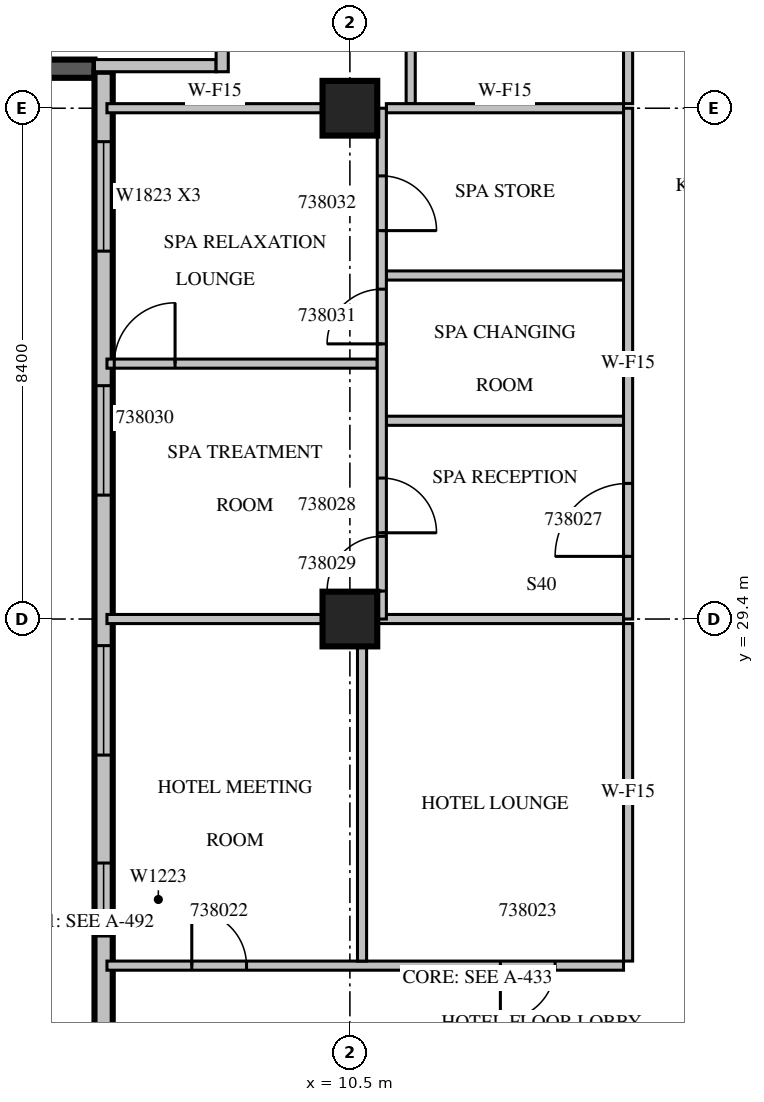
"""IFC4 building model, lengths in metres.
Left out: names, types, materials, properties, quantities, classifications, styles, units other than length and angle.
Written with IfcOpenShell. Run it as: python <this file> out.ifc"""

import sys

from ifc_helpers import new_model, si_unit, direction, frame, frame_2d, origin, origin_2d, place, context, subcontext, project, spatial, rectangle, extrude, source, transform, mapped, element, fill, save


model = new_model("IFC4")
c1 = context("Model", 3, precision=1e-05, world=origin(), true_north=direction((0.0, 1.0)))
c2 = subcontext(c1, "Body", "Model", "MODEL_VIEW")
j1 = project(units=[si_unit("LENGTHUNIT", "METRE"), si_unit("PLANEANGLEUNIT", "RADIAN")], contexts=[c1])
p1 = place(None, origin())
s1 = spatial("IfcSite", under=j1, at=p1, CompositionType="ELEMENT")
p2 = place(p1, origin())
s2 = spatial("IfcBuilding", under=s1, at=p2, CompositionType="ELEMENT")
p3 = place(p2, frame((0.0, 0.0, 177.8)))
s3 = spatial("IfcBuildingStorey", under=s2, at=p3, CompositionType="ELEMENT", Elevation=177.8)
m1 = source(origin(), c2, "Body", "SweptSolid", [
    extrude(rectangle(XDim=0.9, YDim=0.9, at=origin_2d()), origin(), (0.0, 0.0, 1.0), 3.8),
])
for number, where, z_axis, x_axis in (
    (1, (10.5, 29.4, 0.0), (0.0, 0.0, 1.0), (1.0, 0.0, 0.0)),
    (2, (10.5, 37.8, 0.0), (0.0, 0.0, 1.0), (1.0, 0.0, 0.0)),
):
    element("IfcColumn", number, at=place(p3, frame(where, z_axis=z_axis, x_axis=x_axis)), inside=s3, PredefinedType="COLUMN", context=c2, shape_type="MappedRepresentation", body=[
        mapped(m1, transform((0.0, 0.0, 0.0), scale=1.0)),
    ])
m2 = source(origin(), c2, "Body", "SweptSolid", [
    extrude(rectangle(XDim=6.1, YDim=0.3, at=frame_2d((3.05, 0.0))), origin(), (0.0, 0.0, 1.0), 3.4),
])
p4 = place(p3, frame((0.2, 38.45, 0.0), z_axis=(0.0, 0.0, 1.0), x_axis=(1.0, 0.0, 0.0)))
e3 = element("IfcWall", 3, at=p4, inside=s3, PredefinedType="SOLIDWALL", context=c2, shape_type="MappedRepresentation", body=[
    mapped(m2, transform((0.0, 0.0, 0.0), scale=1.0)),
])
p5 = place(p3, frame((6.45, 38.4, 0.0), z_axis=(0.0, 0.0, 1.0), x_axis=(0.0, -1.0, 0.0)))
e4 = element("IfcWall", 4, at=p5, inside=s3, PredefinedType="STANDARD", context=c2, shape_type="SweptSolid", body=[
    extrude(rectangle(XDim=16.6, YDim=0.3, at=frame_2d((8.3, 0.0))), origin(), (0.0, 0.0, 1.0), 3.4),
])
m3 = source(origin(), c2, "Body", "SweptSolid", [
    extrude(rectangle(XDim=1.8, YDim=2.3, at=frame_2d((0.9, 1.15))), frame((0.0, 0.16, 0.0), z_axis=(0.0, -1.0, 0.0), x_axis=(1.0, 0.0, 0.0)), (0.0, 0.0, 1.0), 0.32),
])
p6 = place(p5, frame((1.15, 0.0, 0.6)))
e5 = element("IfcOpeningElement", 5, at=p6, cuts=e4, PredefinedType="OPENING", context=c2, shape_type="MappedRepresentation", body=[
    mapped(m3, transform((0.0, 0.0, 0.0), scale=1.0)),
])
p7 = place(p5, frame((5.162, 0.0, 0.6)))
e6 = element("IfcOpeningElement", 6, at=p7, cuts=e4, PredefinedType="OPENING", context=c2, shape_type="MappedRepresentation", body=[
    mapped(m3, transform((0.0, 0.0, 0.0), scale=1.0)),
])
p8 = place(p5, frame((9.438, 0.0, 0.6)))
e7 = element("IfcOpeningElement", 7, at=p8, cuts=e4, PredefinedType="OPENING", context=c2, shape_type="MappedRepresentation", body=[
    mapped(m3, transform((0.0, 0.0, 0.0), scale=1.0)),
])
m4 = source(origin(), c2, "Body", "SweptSolid", [
    extrude(rectangle(XDim=1.2, YDim=2.3, at=frame_2d((0.6, 1.15))), frame((0.0, 0.16, 0.0), z_axis=(0.0, -1.0, 0.0), x_axis=(1.0, 0.0, 0.0)), (0.0, 0.0, 1.0), 0.32),
])
p9 = place(p5, frame((13.012, 0.0, 0.6)))
e8 = element("IfcOpeningElement", 8, at=p9, cuts=e4, PredefinedType="OPENING", context=c2, shape_type="MappedRepresentation", body=[
    mapped(m4, transform((0.0, 0.0, 0.0), scale=1.0)),
])
p10 = place(p3, frame((6.3, 38.5, 0.0), z_axis=(0.0, 0.0, 1.0), x_axis=(1.0, 0.0, 0.0)))
e9 = element("IfcWall", 9, at=p10, inside=s3, PredefinedType="PARTITIONING", context=c2, shape_type="SweptSolid", body=[
    extrude(rectangle(XDim=2.0, YDim=0.2, at=frame_2d((1.0, 0.0))), origin(), (0.0, 0.0, 1.0), 3.4),
])
m5 = source(origin(), c2, "Body", "SweptSolid", [
    extrude(rectangle(XDim=5.45, YDim=0.2, at=frame_2d((2.725, 0.0))), origin(), (0.0, 0.0, 1.0), 3.4),
])
p11 = place(p3, frame((8.4, 38.4, 0.0), z_axis=(0.0, 0.0, 1.0), x_axis=(0.0, 1.0, 0.0)))
e10 = element("IfcWall", 10, at=p11, inside=s3, PredefinedType="PARTITIONING", context=c2, shape_type="MappedRepresentation", body=[
    mapped(m5, transform((0.0, 0.0, 0.0), scale=1.0)),
])
m6 = source(origin(), c2, "Body", "SweptSolid", [
    extrude(rectangle(XDim=1.2, YDim=2.1, at=frame_2d((0.6, 1.05))), frame((0.0, 0.11, 0.0), z_axis=(0.0, -1.0, 0.0), x_axis=(1.0, 0.0, 0.0)), (0.0, 0.0, 1.0), 0.22),
])
p12 = place(p11, frame((0.4, 0.0, 0.0)))
e11 = element("IfcOpeningElement", 11, at=p12, cuts=e10, PredefinedType="OPENING", context=c2, shape_type="MappedRepresentation", body=[
    mapped(m6, transform((0.0, 0.0, 0.0), scale=1.0)),
])
m7 = source(origin(), c2, "Body", "SweptSolid", [
    extrude(rectangle(XDim=0.9, YDim=2.1, at=frame_2d((0.45, 1.05))), frame((0.0, 0.11, 0.0), z_axis=(0.0, -1.0, 0.0), x_axis=(1.0, 0.0, 0.0)), (0.0, 0.0, 1.0), 0.22),
])
p13 = place(p11, frame((3.25, 0.0, 0.0)))
e12 = element("IfcOpeningElement", 12, at=p13, cuts=e10, PredefinedType="OPENING", context=c2, shape_type="MappedRepresentation", body=[
    mapped(m7, transform((0.0, 0.0, 0.0), scale=1.0)),
])
p14 = place(p3, frame((6.505, 23.7, 0.0), z_axis=(0.0, 0.0, 1.0), x_axis=(1.0, 0.0, 0.0)))
e13 = element("IfcWall", 13, at=p14, inside=s3, PredefinedType="PARTITIONING", context=c2, shape_type="SweptSolid", body=[
    extrude(rectangle(XDim=8.495, YDim=0.15, at=frame_2d((4.247, 0.0))), origin(), (0.0, 0.0, 1.0), 3.4),
])
m8 = source(origin(), c2, "Body", "SweptSolid", [
    extrude(rectangle(XDim=0.9, YDim=2.1, at=frame_2d((0.45, 1.05))), frame((0.0, 0.085, 0.0), z_axis=(0.0, -1.0, 0.0), x_axis=(1.0, 0.0, 0.0)), (0.0, 0.0, 1.0), 0.17),
])
p15 = place(p14, frame((1.395, 0.0, 0.0)))
e14 = element("IfcOpeningElement", 14, at=p15, cuts=e13, PredefinedType="OPENING", context=c2, shape_type="MappedRepresentation", body=[
    mapped(m8, transform((0.0, 0.0, 0.0), scale=1.0)),
])
p16 = place(p14, frame((6.47, 0.0, 0.0)))
e15 = element("IfcOpeningElement", 15, at=p16, cuts=e13, PredefinedType="OPENING", context=c2, shape_type="MappedRepresentation", body=[
    mapped(m8, transform((0.0, 0.0, 0.0), scale=1.0)),
])
p17 = place(p3, frame((10.7, 23.775, 0.0), z_axis=(0.0, 0.0, 1.0), x_axis=(0.0, 1.0, 0.0)))
e16 = element("IfcWall", 16, at=p17, inside=s3, PredefinedType="PARTITIONING", context=c2, shape_type="SweptSolid", body=[
    extrude(rectangle(XDim=5.176, YDim=0.15, at=frame_2d((2.588, 0.0))), origin(), (0.0, 0.0, 1.0), 3.4),
])
m9 = source(origin(), c2, "Body", "SweptSolid", [
    extrude(rectangle(XDim=5.55, YDim=0.15, at=frame_2d((2.775, 0.0))), origin(), (0.0, 0.0, 1.0), 3.4),
])
p18 = place(p3, frame((15.075, 23.775, 0.0), z_axis=(0.0, 0.0, 1.0), x_axis=(0.0, 1.0, 0.0)))
e17 = element("IfcWall", 17, at=p18, inside=s3, PredefinedType="PARTITIONING", context=c2, shape_type="MappedRepresentation", body=[
    mapped(m9, transform((0.0, 0.0, 0.0), scale=1.0)),
])
p19 = place(p3, frame((10.051, 29.4, 0.0), z_axis=(0.0, 0.0, 1.0), x_axis=(-1.0, 0.0, 0.0)))
e18 = element("IfcWall", 18, at=p19, inside=s3, PredefinedType="PARTITIONING", context=c2, shape_type="SweptSolid", body=[
    extrude(rectangle(XDim=3.546, YDim=0.15, at=frame_2d((1.773, 0.0))), origin(), (0.0, 0.0, 1.0), 3.4),
])
m10 = source(origin(), c2, "Body", "SweptSolid", [
    extrude(rectangle(XDim=4.051, YDim=0.15, at=frame_2d((2.026, 0.0))), origin(), (0.0, 0.0, 1.0), 3.4),
])
p20 = place(p3, frame((15.0, 29.4, 0.0), z_axis=(0.0, 0.0, 1.0), x_axis=(-1.0, 0.0, 0.0)))
e19 = element("IfcWall", 19, at=p20, inside=s3, PredefinedType="PARTITIONING", context=c2, shape_type="MappedRepresentation", body=[
    mapped(m10, transform((0.0, 0.0, 0.0), scale=1.0)),
])
m11 = source(origin(), c2, "Body", "SweptSolid", [
    extrude(rectangle(XDim=6.45, YDim=0.15, at=frame_2d((3.225, 0.0))), origin(), (0.0, 0.0, 1.0), 3.4),
])
p21 = place(p3, frame((11.5, 44.325, 0.0), z_axis=(0.0, 0.0, 1.0), x_axis=(0.0, -1.0, 0.0)))
e20 = element("IfcWall", 20, at=p21, inside=s3, PredefinedType="PARTITIONING", context=c2, shape_type="MappedRepresentation", body=[
    mapped(m11, transform((0.0, 0.0, 0.0), scale=1.0)),
])
p22 = place(p3, frame((15.075, 37.875, 0.0), z_axis=(0.0, 0.0, 1.0), x_axis=(0.0, 1.0, 0.0)))
e21 = element("IfcWall", 21, at=p22, inside=s3, PredefinedType="PARTITIONING", context=c2, shape_type="MappedRepresentation", body=[
    mapped(m11, transform((0.0, 0.0, 0.0), scale=1.0)),
])
p23 = place(p22, frame((2.737, 0.0, 0.0)))
e22 = element("IfcOpeningElement", 22, at=p23, cuts=e21, PredefinedType="OPENING", context=c2, shape_type="MappedRepresentation", body=[
    mapped(m8, transform((0.0, 0.0, 0.0), scale=1.0)),
])
p24 = place(p3, frame((10.95, 33.6, 0.0), z_axis=(0.0, 0.0, 1.0), x_axis=(-1.0, 0.0, 0.0)))
e23 = element("IfcWall", 23, at=p24, inside=s3, PredefinedType="PARTITIONING", context=c2, shape_type="SweptSolid", body=[
    extrude(rectangle(XDim=4.445, YDim=0.15, at=frame_2d((2.223, 0.0))), origin(), (0.0, 0.0, 1.0), 3.4),
])
m12 = source(origin(), c2, "Body", "SweptSolid", [
    extrude(rectangle(XDim=1.0, YDim=2.1, at=frame_2d((0.5, 1.05))), frame((0.0, 0.085, 0.0), z_axis=(0.0, -1.0, 0.0), x_axis=(1.0, 0.0, 0.0)), (0.0, 0.0, 1.0), 0.17),
])
p25 = place(p24, frame((3.325, 0.0, 0.0)))
e24 = element("IfcOpeningElement", 24, at=p25, cuts=e23, PredefinedType="OPENING", context=c2, shape_type="MappedRepresentation", body=[
    mapped(m12, transform((0.0, 0.0, 0.0), scale=1.0)),
])
m13 = source(origin(), c2, "Body", "SweptSolid", [
    extrude(rectangle(XDim=3.9, YDim=0.15, at=frame_2d((1.95, 0.0))), origin(), (0.0, 0.0, 1.0), 3.4),
])
for number, where, z_axis, x_axis in (
    (25, (15.0, 32.66, 0.0), (0.0, 0.0, 1.0), (-1.0, 0.0, 0.0)),
    (26, (15.0, 35.049, 0.0), (0.0, 0.0, 1.0), (-1.0, 0.0, 0.0)),
):
    element("IfcWall", number, at=place(p3, frame(where, z_axis=z_axis, x_axis=x_axis)), inside=s3, PredefinedType="PARTITIONING", context=c2, shape_type="MappedRepresentation", body=[
        mapped(m13, transform((0.0, 0.0, 0.0), scale=1.0)),
    ])
m14 = source(origin(), c2, "Body", "SweptSolid", [
    extrude(rectangle(XDim=3.546, YDim=0.15, at=frame_2d((1.773, 0.0))), origin(), (0.0, 0.0, 1.0), 3.4),
])
p26 = place(p3, frame((10.051, 37.8, 0.0), z_axis=(0.0, 0.0, 1.0), x_axis=(-1.0, 0.0, 0.0)))
e27 = element("IfcWall", 27, at=p26, inside=s3, PredefinedType="PARTITIONING", context=c2, shape_type="MappedRepresentation", body=[
    mapped(m14, transform((0.0, 0.0, 0.0), scale=1.0)),
])
p27 = place(p3, frame((15.0, 37.8, 0.0), z_axis=(0.0, 0.0, 1.0), x_axis=(-1.0, 0.0, 0.0)))
e28 = element("IfcWall", 28, at=p27, inside=s3, PredefinedType="PARTITIONING", context=c2, shape_type="MappedRepresentation", body=[
    mapped(m13, transform((0.0, 0.0, 0.0), scale=1.0)),
])
m15 = source(origin(), c2, "Body", "SweptSolid", [
    extrude(rectangle(XDim=8.4, YDim=0.15, at=frame_2d((4.2, 0.0))), origin(), (0.0, 0.0, 1.0), 3.4),
])
p28 = place(p3, frame((11.025, 29.4, 0.0), z_axis=(0.0, 0.0, 1.0), x_axis=(0.0, 1.0, 0.0)))
e29 = element("IfcWall", 29, at=p28, inside=s3, PredefinedType="PARTITIONING", context=c2, shape_type="MappedRepresentation", body=[
    mapped(m15, transform((0.0, 0.0, 0.0), scale=1.0)),
])
p29 = place(p28, frame((1.418, 0.0, 0.0)))
e30 = element("IfcOpeningElement", 30, at=p29, cuts=e29, PredefinedType="OPENING", context=c2, shape_type="MappedRepresentation", body=[
    mapped(m8, transform((0.0, 0.0, 0.0), scale=1.0)),
])
p30 = place(p28, frame((0.46, 0.0, 0.0)))
e31 = element("IfcOpeningElement", 31, at=p30, cuts=e29, PredefinedType="OPENING", context=c2, shape_type="MappedRepresentation", body=[
    mapped(m8, transform((0.0, 0.0, 0.0), scale=1.0)),
])
p31 = place(p28, frame((4.525, 0.0, 0.0)))
e32 = element("IfcOpeningElement", 32, at=p31, cuts=e29, PredefinedType="OPENING", context=c2, shape_type="MappedRepresentation", body=[
    mapped(m8, transform((0.0, 0.0, 0.0), scale=1.0)),
])
p32 = place(p28, frame((6.387, 0.0, 0.0)))
e33 = element("IfcOpeningElement", 33, at=p32, cuts=e29, PredefinedType="OPENING", context=c2, shape_type="MappedRepresentation", body=[
    mapped(m8, transform((0.0, 0.0, 0.0), scale=1.0)),
])
p33 = place(p3, frame((15.075, 29.4, 0.0), z_axis=(0.0, 0.0, 1.0), x_axis=(0.0, 1.0, 0.0)))
e34 = element("IfcWall", 34, at=p33, inside=s3, PredefinedType="PARTITIONING", context=c2, shape_type="MappedRepresentation", body=[
    mapped(m15, transform((0.0, 0.0, 0.0), scale=1.0)),
])
m16 = source(origin(), c2, "Body", "SweptSolid", [
    extrude(rectangle(XDim=1.2, YDim=2.1, at=frame_2d((0.6, 1.05))), frame((0.0, 0.085, 0.0), z_axis=(0.0, -1.0, 0.0), x_axis=(1.0, 0.0, 0.0)), (0.0, 0.0, 1.0), 0.17),
])
p34 = place(p33, frame((1.03, 0.0, 0.0)))
e35 = element("IfcOpeningElement", 35, at=p34, cuts=e34, PredefinedType="OPENING", context=c2, shape_type="MappedRepresentation", body=[
    mapped(m16, transform((0.0, 0.0, 0.0), scale=1.0)),
])
m17 = source(origin(), c2, "Body", "SweptSolid", [
    extrude(rectangle(XDim=1.8, YDim=2.3, at=frame_2d((0.9, 1.15))), frame((0.0, 0.03, 0.0), z_axis=(0.0, -1.0, 0.0), x_axis=(1.0, 0.0, 0.0)), (0.0, 0.0, 1.0), 0.06),
])
p35 = place(p6, origin())
e36 = element("IfcWindow", 36, at=p35, inside=s3, PartitioningType="SINGLE_PANEL", PredefinedType="WINDOW", context=c2, shape_type="MappedRepresentation", body=[
    mapped(m17, transform((0.0, 0.0, 0.0), scale=1.0)),
])
fill(e5, e36)
p36 = place(p7, origin())
e37 = element("IfcWindow", 37, at=p36, inside=s3, PartitioningType="SINGLE_PANEL", PredefinedType="WINDOW", context=c2, shape_type="MappedRepresentation", body=[
    mapped(m17, transform((0.0, 0.0, 0.0), scale=1.0)),
])
fill(e6, e37)
p37 = place(p8, origin())
e38 = element("IfcWindow", 38, at=p37, inside=s3, PartitioningType="SINGLE_PANEL", PredefinedType="WINDOW", context=c2, shape_type="MappedRepresentation", body=[
    mapped(m17, transform((0.0, 0.0, 0.0), scale=1.0)),
])
fill(e7, e38)
m18 = source(origin(), c2, "Body", "SweptSolid", [
    extrude(rectangle(XDim=1.2, YDim=2.3, at=frame_2d((0.6, 1.15))), frame((0.0, 0.03, 0.0), z_axis=(0.0, -1.0, 0.0), x_axis=(1.0, 0.0, 0.0)), (0.0, 0.0, 1.0), 0.06),
])
p38 = place(p9, origin())
e39 = element("IfcWindow", 39, at=p38, inside=s3, PartitioningType="SINGLE_PANEL", PredefinedType="WINDOW", context=c2, shape_type="MappedRepresentation", body=[
    mapped(m18, transform((0.0, 0.0, 0.0), scale=1.0)),
])
fill(e8, e39)
m19 = source(origin(), c2, "Body", "SweptSolid", [
    extrude(rectangle(XDim=0.9, YDim=2.1, at=frame_2d((0.45, 1.05))), frame((0.0, 0.025, 0.0), z_axis=(0.0, -1.0, 0.0), x_axis=(1.0, 0.0, 0.0)), (0.0, 0.0, 1.0), 0.05),
])
p39 = place(p15, origin())
e40 = element("IfcDoor", 40, at=p39, inside=s3, OperationType="SINGLE_SWING_LEFT", PredefinedType="DOOR", context=c2, shape_type="MappedRepresentation", body=[
    mapped(m19, transform((0.0, 0.0, 0.0), scale=1.0)),
])
fill(e14, e40)
p40 = place(p16, origin())
e41 = element("IfcDoor", 41, at=p40, inside=s3, OperationType="SINGLE_SWING_RIGHT", PredefinedType="DOOR", context=c2, shape_type="MappedRepresentation", body=[
    mapped(m19, transform((0.0, 0.0, 0.0), scale=1.0)),
])
fill(e15, e41)
m20 = source(origin(), c2, "Body", "SweptSolid", [
    extrude(rectangle(XDim=1.2, YDim=2.1, at=frame_2d((0.6, 1.05))), frame((0.0, 0.025, 0.0), z_axis=(0.0, -1.0, 0.0), x_axis=(1.0, 0.0, 0.0)), (0.0, 0.0, 1.0), 0.05),
])
p41 = place(p34, origin())
e42 = element("IfcDoor", 42, at=p41, inside=s3, OperationType="SINGLE_SWING_LEFT", PredefinedType="DOOR", context=c2, shape_type="MappedRepresentation", body=[
    mapped(m20, transform((0.0, 0.0, 0.0), scale=1.0)),
])
fill(e35, e42)
p42 = place(p29, origin())
e43 = element("IfcDoor", 43, at=p42, inside=s3, OperationType="SINGLE_SWING_RIGHT", PredefinedType="DOOR", context=c2, shape_type="MappedRepresentation", body=[
    mapped(m19, transform((0.0, 0.0, 0.0), scale=1.0)),
])
fill(e30, e43)
p43 = place(p30, origin())
e44 = element("IfcDoor", 44, at=p43, inside=s3, OperationType="SINGLE_SWING_LEFT", PredefinedType="DOOR", context=c2, shape_type="MappedRepresentation", body=[
    mapped(m19, transform((0.0, 0.0, 0.0), scale=1.0)),
])
fill(e31, e44)
m21 = source(origin(), c2, "Body", "SweptSolid", [
    extrude(rectangle(XDim=1.0, YDim=2.1, at=frame_2d((0.5, 1.05))), frame((0.0, 0.025, 0.0), z_axis=(0.0, -1.0, 0.0), x_axis=(1.0, 0.0, 0.0)), (0.0, 0.0, 1.0), 0.05),
])
p44 = place(p25, origin())
e45 = element("IfcDoor", 45, at=p44, inside=s3, OperationType="SINGLE_SWING_RIGHT", PredefinedType="DOOR", context=c2, shape_type="MappedRepresentation", body=[
    mapped(m21, transform((0.0, 0.0, 0.0), scale=1.0)),
])
fill(e24, e45)
p45 = place(p31, origin())
e46 = element("IfcDoor", 46, at=p45, inside=s3, OperationType="SINGLE_SWING_LEFT", PredefinedType="DOOR", context=c2, shape_type="MappedRepresentation", body=[
    mapped(m19, transform((0.0, 0.0, 0.0), scale=1.0)),
])
fill(e32, e46)
p46 = place(p32, origin())
e47 = element("IfcDoor", 47, at=p46, inside=s3, OperationType="SINGLE_SWING_RIGHT", PredefinedType="DOOR", context=c2, shape_type="MappedRepresentation", body=[
    mapped(m19, transform((0.0, 0.0, 0.0), scale=1.0)),
])
fill(e33, e47)
save(model, sys.argv[1])
